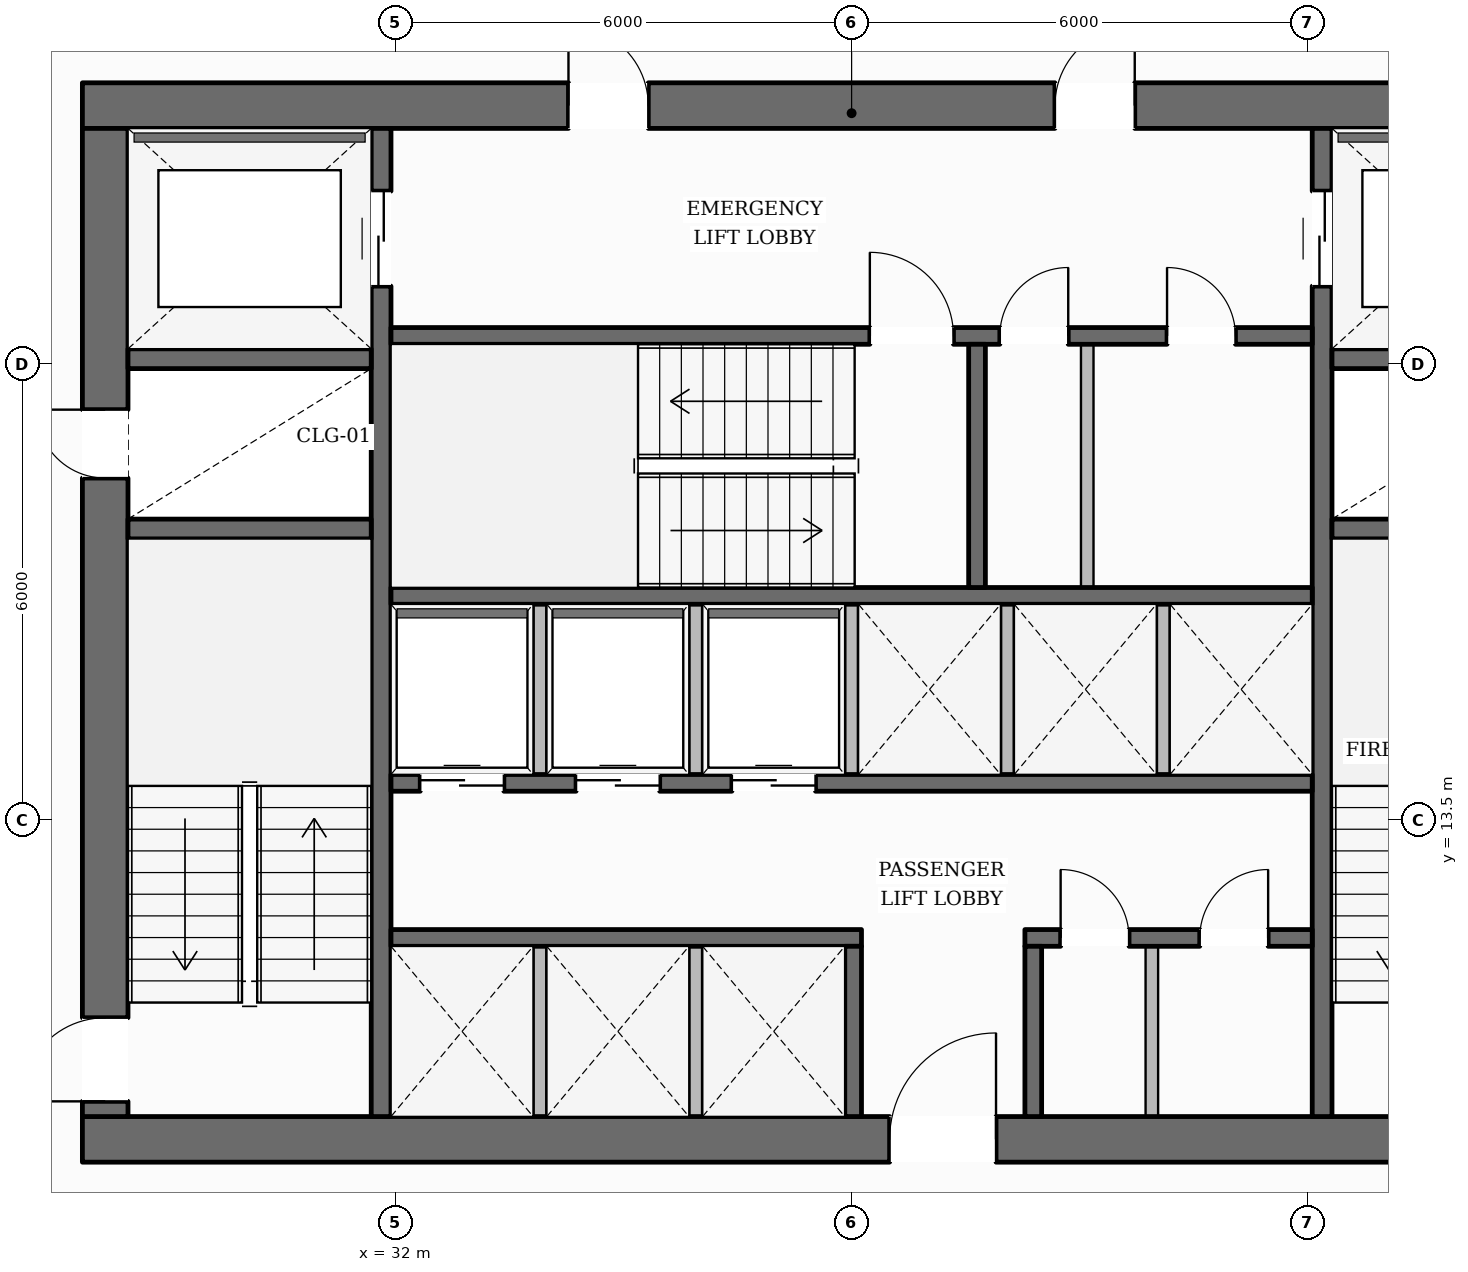
"""IFC4 building model, lengths in metres.
Left out: names, types, materials, properties, quantities, classifications, styles, units other than length and angle.
Written with IfcOpenShell. Run it as: python <this file> out.ifc"""

import sys

from ifc_helpers import new_model, si_unit, direction, frame, frame_2d, origin, place, context, subcontext, project, spatial, rectangle, extrude, element, fill, save


model = new_model("IFC4")
c1 = context("Model", 3, precision=1e-05, world=origin(), true_north=direction((0.0, 1.0)))
c2 = subcontext(c1, "Body", "Model", "MODEL_VIEW")
j1 = project(units=[si_unit("LENGTHUNIT", "METRE"), si_unit("PLANEANGLEUNIT", "RADIAN")], contexts=[c1])
p1 = place(None, origin())
s1 = spatial("IfcSite", under=j1, at=p1, CompositionType="ELEMENT")
p2 = place(p1, origin())
s2 = spatial("IfcBuilding", under=s1, at=p2, CompositionType="ELEMENT")
p3 = place(p2, frame((0.0, 0.0, 6.0)))
s3 = spatial("IfcBuildingStorey", under=s2, at=p3, CompositionType="ELEMENT", Elevation=6.0)
p4 = place(p3, frame((27.88, 9.3, 0.0), z_axis=(0.0, 0.0, 1.0), x_axis=(1.0, 0.0, 0.0)))
e1 = element("IfcWall", 1, at=p4, inside=s3, PredefinedType="SOLIDWALL", context=c2, shape_type="SweptSolid", body=[
    extrude(rectangle(XDim=20.24, YDim=0.6, at=frame_2d((10.12, 0.0))), origin(), (0.0, 0.0, 1.0), 3.59),
])
p5 = place(p4, frame((10.62, 0.0, 0.0)))
e2 = element("IfcOpeningElement", 2, at=p5, cuts=e1, PredefinedType="OPENING", context=c2, shape_type="SweptSolid", body=[
    extrude(rectangle(XDim=1.4, YDim=2.2, at=frame_2d((0.7, 1.1))), frame((0.0, 0.31, 0.0), z_axis=(0.0, -1.0, 0.0), x_axis=(1.0, 0.0, 0.0)), (0.0, 0.0, 1.0), 0.62),
])
p6 = place(p3, frame((27.88, 22.9, 0.0), z_axis=(0.0, 0.0, 1.0), x_axis=(1.0, 0.0, 0.0)))
e3 = element("IfcWall", 3, at=p6, inside=s3, PredefinedType="SOLIDWALL", context=c2, shape_type="SweptSolid", body=[
    extrude(rectangle(XDim=20.24, YDim=0.6, at=frame_2d((10.12, 0.0))), origin(), (0.0, 0.0, 1.0), 3.59),
])
p7 = place(p6, frame((6.395, 0.0, 0.0)))
e4 = element("IfcOpeningElement", 4, at=p7, cuts=e3, PredefinedType="OPENING", context=c2, shape_type="SweptSolid", body=[
    extrude(rectangle(XDim=1.05, YDim=2.15, at=frame_2d((0.525, 1.075))), frame((0.0, 0.31, 0.0), z_axis=(0.0, -1.0, 0.0), x_axis=(1.0, 0.0, 0.0)), (0.0, 0.0, 1.0), 0.62),
])
p8 = place(p6, frame((12.795, 0.0, 0.0)))
e5 = element("IfcOpeningElement", 5, at=p8, cuts=e3, PredefinedType="OPENING", context=c2, shape_type="SweptSolid", body=[
    extrude(rectangle(XDim=1.05, YDim=2.15, at=frame_2d((0.525, 1.075))), frame((0.0, 0.31, 0.0), z_axis=(0.0, -1.0, 0.0), x_axis=(1.0, 0.0, 0.0)), (0.0, 0.0, 1.0), 0.62),
])
p9 = place(p3, frame((28.18, 9.6, 0.0), z_axis=(0.0, 0.0, 1.0), x_axis=(0.0, 1.0, 0.0)))
e6 = element("IfcWall", 6, at=p9, inside=s3, PredefinedType="SOLIDWALL", context=c2, shape_type="SweptSolid", body=[
    extrude(rectangle(XDim=13.0, YDim=0.6, at=frame_2d((6.5, 0.0))), origin(), (0.0, 0.0, 1.0), 3.59),
])
p10 = place(p9, frame((0.2, 0.0, 0.0)))
e7 = element("IfcOpeningElement", 7, at=p10, cuts=e6, PredefinedType="OPENING", context=c2, shape_type="SweptSolid", body=[
    extrude(rectangle(XDim=1.1, YDim=2.15, at=frame_2d((0.55, 1.075))), frame((0.0, 0.31, 0.0), z_axis=(0.0, -1.0, 0.0), x_axis=(1.0, 0.0, 0.0)), (0.0, 0.0, 1.0), 0.62),
])
p11 = place(p9, frame((8.4, 0.0, 0.0)))
e8 = element("IfcOpeningElement", 8, at=p11, cuts=e6, PredefinedType="OPENING", context=c2, shape_type="SweptSolid", body=[
    extrude(rectangle(XDim=0.9, YDim=2.1, at=frame_2d((0.45, 1.05))), frame((0.0, 0.31, 0.0), z_axis=(0.0, -1.0, 0.0), x_axis=(1.0, 0.0, 0.0)), (0.0, 0.0, 1.0), 0.62),
])
p12 = place(p3, frame((31.81, 9.6, 0.0), z_axis=(0.0, 0.0, 1.0), x_axis=(0.0, 1.0, 0.0)))
e9 = element("IfcWall", 9, at=p12, inside=s3, PredefinedType="SHEAR", context=c2, shape_type="SweptSolid", body=[
    extrude(rectangle(XDim=13.0, YDim=0.26, at=frame_2d((6.5, 0.0))), origin(), (0.0, 0.0, 1.0), 3.59),
])
p13 = place(p12, frame((10.925, 0.0, 0.0)))
e10 = element("IfcOpeningElement", 10, at=p13, cuts=e9, PredefinedType="OPENING", context=c2, shape_type="SweptSolid", body=[
    extrude(rectangle(XDim=1.25, YDim=2.25, at=frame_2d((0.625, 1.125))), frame((0.0, 0.14, 0.0), z_axis=(0.0, -1.0, 0.0), x_axis=(1.0, 0.0, 0.0)), (0.0, 0.0, 1.0), 0.28),
])
p14 = place(p3, frame((44.19, 9.6, 0.0), z_axis=(0.0, 0.0, 1.0), x_axis=(0.0, 1.0, 0.0)))
e11 = element("IfcWall", 11, at=p14, inside=s3, PredefinedType="SHEAR", context=c2, shape_type="SweptSolid", body=[
    extrude(rectangle(XDim=13.0, YDim=0.26, at=frame_2d((6.5, 0.0))), origin(), (0.0, 0.0, 1.0), 3.59),
])
p15 = place(p14, frame((10.925, 0.0, 0.0)))
e12 = element("IfcOpeningElement", 12, at=p15, cuts=e11, PredefinedType="OPENING", context=c2, shape_type="SweptSolid", body=[
    extrude(rectangle(XDim=1.25, YDim=2.25, at=frame_2d((0.625, 1.125))), frame((0.0, 0.14, 0.0), z_axis=(0.0, -1.0, 0.0), x_axis=(1.0, 0.0, 0.0)), (0.0, 0.0, 1.0), 0.28),
])
for number, where, z_axis, x_axis in (
    (13, (28.48, 17.33, 0.0), (0.0, 0.0, 1.0), (1.0, 0.0, 0.0)),
    (14, (28.48, 19.57, 0.0), (0.0, 0.0, 1.0), (1.0, 0.0, 0.0)),
    (15, (44.32, 17.33, 0.0), (0.0, 0.0, 1.0), (1.0, 0.0, 0.0)),
    (16, (44.32, 19.57, 0.0), (0.0, 0.0, 1.0), (1.0, 0.0, 0.0)),
):
    element("IfcWall", number, at=place(p3, frame(where, z_axis=z_axis, x_axis=x_axis)), inside=s3, PredefinedType="SHEAR", context=c2, shape_type="SweptSolid", body=[
        extrude(rectangle(XDim=3.2, YDim=0.26, at=frame_2d((1.6, 0.0))), origin(), (0.0, 0.0, 1.0), 3.59),
    ])
p16 = place(p3, frame((31.94, 19.87, 0.0), z_axis=(0.0, 0.0, 1.0), x_axis=(1.0, 0.0, 0.0)))
e17 = element("IfcWall", 17, at=p16, inside=s3, PredefinedType="SOLIDWALL", context=c2, shape_type="SweptSolid", body=[
    extrude(rectangle(XDim=12.12, YDim=0.22, at=frame_2d((6.06, 0.0))), origin(), (0.0, 0.0, 1.0), 3.59),
])
p17 = place(p16, frame((6.3, 0.0, 0.0)))
e18 = element("IfcOpeningElement", 18, at=p17, cuts=e17, PredefinedType="OPENING", context=c2, shape_type="SweptSolid", body=[
    extrude(rectangle(XDim=1.1, YDim=2.15, at=frame_2d((0.55, 1.075))), frame((0.0, 0.12, 0.0), z_axis=(0.0, -1.0, 0.0), x_axis=(1.0, 0.0, 0.0)), (0.0, 0.0, 1.0), 0.24),
])
p18 = place(p16, frame((8.01, 0.0, 0.0)))
e19 = element("IfcOpeningElement", 19, at=p18, cuts=e17, PredefinedType="OPENING", context=c2, shape_type="SweptSolid", body=[
    extrude(rectangle(XDim=0.9, YDim=2.1, at=frame_2d((0.45, 1.05))), frame((0.0, 0.12, 0.0), z_axis=(0.0, -1.0, 0.0), x_axis=(1.0, 0.0, 0.0)), (0.0, 0.0, 1.0), 0.24),
])
p19 = place(p16, frame((10.21, 0.0, 0.0)))
e20 = element("IfcOpeningElement", 20, at=p19, cuts=e17, PredefinedType="OPENING", context=c2, shape_type="SweptSolid", body=[
    extrude(rectangle(XDim=0.9, YDim=2.1, at=frame_2d((0.45, 1.05))), frame((0.0, 0.12, 0.0), z_axis=(0.0, -1.0, 0.0), x_axis=(1.0, 0.0, 0.0)), (0.0, 0.0, 1.0), 0.24),
])
p20 = place(p3, frame((31.94, 16.45, 0.0), z_axis=(0.0, 0.0, 1.0), x_axis=(1.0, 0.0, 0.0)))
e21 = element("IfcWall", 21, at=p20, inside=s3, PredefinedType="SOLIDWALL", context=c2, shape_type="SweptSolid", body=[
    extrude(rectangle(XDim=12.12, YDim=0.22, at=frame_2d((6.06, 0.0))), origin(), (0.0, 0.0, 1.0), 3.59),
])
p21 = place(p3, frame((39.65, 16.56, 0.0), z_axis=(0.0, 0.0, 1.0), x_axis=(0.0, 1.0, 0.0)))
e22 = element("IfcWall", 22, at=p21, inside=s3, PredefinedType="SOLIDWALL", context=c2, shape_type="SweptSolid", body=[
    extrude(rectangle(XDim=3.2, YDim=0.22, at=frame_2d((1.6, 0.0))), origin(), (0.0, 0.0, 1.0), 3.59),
])
p22 = place(p3, frame((31.94, 13.99, 0.0), z_axis=(0.0, 0.0, 1.0), x_axis=(1.0, 0.0, 0.0)))
e23 = element("IfcWall", 23, at=p22, inside=s3, PredefinedType="SOLIDWALL", context=c2, shape_type="SweptSolid", body=[
    extrude(rectangle(XDim=12.12, YDim=0.22, at=frame_2d((6.06, 0.0))), origin(), (0.0, 0.0, 1.0), 3.59),
])
p23 = place(p22, frame((0.385, 0.0, 0.0)))
e24 = element("IfcOpeningElement", 24, at=p23, cuts=e23, PredefinedType="OPENING", context=c2, shape_type="SweptSolid", body=[
    extrude(rectangle(XDim=1.1, YDim=2.2, at=frame_2d((0.55, 1.1))), frame((0.0, 0.12, 0.0), z_axis=(0.0, -1.0, 0.0), x_axis=(1.0, 0.0, 0.0)), (0.0, 0.0, 1.0), 0.24),
])
p24 = place(p22, frame((2.435, 0.0, 0.0)))
e25 = element("IfcOpeningElement", 25, at=p24, cuts=e23, PredefinedType="OPENING", context=c2, shape_type="SweptSolid", body=[
    extrude(rectangle(XDim=1.1, YDim=2.2, at=frame_2d((0.55, 1.1))), frame((0.0, 0.12, 0.0), z_axis=(0.0, -1.0, 0.0), x_axis=(1.0, 0.0, 0.0)), (0.0, 0.0, 1.0), 0.24),
])
p25 = place(p22, frame((4.485, 0.0, 0.0)))
e26 = element("IfcOpeningElement", 26, at=p25, cuts=e23, PredefinedType="OPENING", context=c2, shape_type="SweptSolid", body=[
    extrude(rectangle(XDim=1.1, YDim=2.2, at=frame_2d((0.55, 1.1))), frame((0.0, 0.12, 0.0), z_axis=(0.0, -1.0, 0.0), x_axis=(1.0, 0.0, 0.0)), (0.0, 0.0, 1.0), 0.24),
])
p26 = place(p3, frame((31.94, 11.95, 0.0), z_axis=(0.0, 0.0, 1.0), x_axis=(1.0, 0.0, 0.0)))
e27 = element("IfcWall", 27, at=p26, inside=s3, PredefinedType="SOLIDWALL", context=c2, shape_type="SweptSolid", body=[
    extrude(rectangle(XDim=6.19, YDim=0.22, at=frame_2d((3.095, 0.0))), origin(), (0.0, 0.0, 1.0), 3.59),
])
p27 = place(p3, frame((40.28, 11.95, 0.0), z_axis=(0.0, 0.0, 1.0), x_axis=(1.0, 0.0, 0.0)))
e28 = element("IfcWall", 28, at=p27, inside=s3, PredefinedType="SOLIDWALL", context=c2, shape_type="SweptSolid", body=[
    extrude(rectangle(XDim=3.78, YDim=0.22, at=frame_2d((1.89, 0.0))), origin(), (0.0, 0.0, 1.0), 3.59),
])
p28 = place(p27, frame((0.47, 0.0, 0.0)))
e29 = element("IfcOpeningElement", 29, at=p28, cuts=e28, PredefinedType="OPENING", context=c2, shape_type="SweptSolid", body=[
    extrude(rectangle(XDim=0.9, YDim=2.1, at=frame_2d((0.45, 1.05))), frame((0.0, 0.12, 0.0), z_axis=(0.0, -1.0, 0.0), x_axis=(1.0, 0.0, 0.0)), (0.0, 0.0, 1.0), 0.24),
])
p29 = place(p27, frame((2.3, 0.0, 0.0)))
e30 = element("IfcOpeningElement", 30, at=p29, cuts=e28, PredefinedType="OPENING", context=c2, shape_type="SweptSolid", body=[
    extrude(rectangle(XDim=0.9, YDim=2.1, at=frame_2d((0.45, 1.05))), frame((0.0, 0.12, 0.0), z_axis=(0.0, -1.0, 0.0), x_axis=(1.0, 0.0, 0.0)), (0.0, 0.0, 1.0), 0.24),
])
for number, where, z_axis, x_axis in (
    (31, (38.02, 9.6, 0.0), (0.0, 0.0, 1.0), (0.0, 1.0, 0.0)),
    (32, (40.39, 9.6, 0.0), (0.0, 0.0, 1.0), (0.0, 1.0, 0.0)),
):
    element("IfcWall", number, at=place(p3, frame(where, z_axis=z_axis, x_axis=x_axis)), inside=s3, PredefinedType="SOLIDWALL", context=c2, shape_type="SweptSolid", body=[
        extrude(rectangle(XDim=2.24, YDim=0.22, at=frame_2d((1.12, 0.0))), origin(), (0.0, 0.0, 1.0), 3.59),
    ])
p30 = place(p3, frame((13.007, 15.062, 0.0), z_axis=(0.0, 0.0, 1.0), x_axis=(0.502349968378, 0.86466439112, 0.0)))
e33 = element("IfcWall", 33, at=p30, inside=s3, PredefinedType="STANDARD", context=c2, shape_type="SweptSolid", body=[
    extrude(rectangle(XDim=33.229, YDim=0.38, at=frame_2d((16.615, 0.0))), origin(), (0.0, 0.0, 1.0), 2.97),
])
p31 = place(p30, frame((29.24, 0.0, 0.65)))
e34 = element("IfcOpeningElement", 34, at=p31, cuts=e33, PredefinedType="OPENING", context=c2, shape_type="SweptSolid", body=[
    extrude(rectangle(XDim=1.65, YDim=1.75, at=frame_2d((0.825, 0.875))), frame((0.0, 0.2, 0.0), z_axis=(0.0, -1.0, 0.0), x_axis=(1.0, 0.0, 0.0)), (0.0, 0.0, 1.0), 0.4),
])
p32 = place(p30, frame((23.861, 0.0, 0.65)))
e35 = element("IfcOpeningElement", 35, at=p32, cuts=e33, PredefinedType="OPENING", context=c2, shape_type="SweptSolid", body=[
    extrude(rectangle(XDim=1.65, YDim=1.75, at=frame_2d((0.825, 0.875))), frame((0.0, 0.2, 0.0), z_axis=(0.0, -1.0, 0.0), x_axis=(1.0, 0.0, 0.0)), (0.0, 0.0, 1.0), 0.4),
])
p33 = place(p30, frame((13.101, 0.0, 0.65)))
e36 = element("IfcOpeningElement", 36, at=p33, cuts=e33, PredefinedType="OPENING", context=c2, shape_type="SweptSolid", body=[
    extrude(rectangle(XDim=1.65, YDim=1.75, at=frame_2d((0.825, 0.875))), frame((0.0, 0.2, 0.0), z_axis=(0.0, -1.0, 0.0), x_axis=(1.0, 0.0, 0.0)), (0.0, 0.0, 1.0), 0.4),
])
p34 = place(p30, frame((7.722, 0.0, 0.65)))
e37 = element("IfcOpeningElement", 37, at=p34, cuts=e33, PredefinedType="OPENING", context=c2, shape_type="SweptSolid", body=[
    extrude(rectangle(XDim=1.65, YDim=1.75, at=frame_2d((0.825, 0.875))), frame((0.0, 0.2, 0.0), z_axis=(0.0, -1.0, 0.0), x_axis=(1.0, 0.0, 0.0)), (0.0, 0.0, 1.0), 0.4),
])
p35 = place(p30, frame((2.342, 0.0, 0.65)))
e38 = element("IfcOpeningElement", 38, at=p35, cuts=e33, PredefinedType="OPENING", context=c2, shape_type="SweptSolid", body=[
    extrude(rectangle(XDim=1.65, YDim=1.75, at=frame_2d((0.825, 0.875))), frame((0.0, 0.2, 0.0), z_axis=(0.0, -1.0, 0.0), x_axis=(1.0, 0.0, 0.0)), (0.0, 0.0, 1.0), 0.4),
])
for number, where, z_axis, x_axis in (
    (39, (33.9, 9.6, 0.0), (0.0, 0.0, 1.0), (0.0, 1.0, 0.0)),
    (40, (35.95, 9.6, 0.0), (0.0, 0.0, 1.0), (0.0, 1.0, 0.0)),
    (41, (33.9, 14.1, 0.0), (0.0, 0.0, 1.0), (0.0, 1.0, 0.0)),
    (42, (35.95, 14.1, 0.0), (0.0, 0.0, 1.0), (0.0, 1.0, 0.0)),
    (43, (38.0, 14.1, 0.0), (0.0, 0.0, 1.0), (0.0, 1.0, 0.0)),
    (44, (40.05, 14.1, 0.0), (0.0, 0.0, 1.0), (0.0, 1.0, 0.0)),
    (45, (42.1, 14.1, 0.0), (0.0, 0.0, 1.0), (0.0, 1.0, 0.0)),
):
    element("IfcWall", number, at=place(p3, frame(where, z_axis=z_axis, x_axis=x_axis)), inside=s3, PredefinedType="PARTITIONING", context=c2, shape_type="SweptSolid", body=[
        extrude(rectangle(XDim=2.24, YDim=0.165, at=frame_2d((1.12, 0.0))), origin(), (0.0, 0.0, 1.0), 3.59),
    ])
p36 = place(p3, frame((41.1, 16.56, 0.0), z_axis=(0.0, 0.0, 1.0), x_axis=(0.0, 1.0, 0.0)))
e46 = element("IfcWall", 46, at=p36, inside=s3, PredefinedType="PARTITIONING", context=c2, shape_type="SweptSolid", body=[
    extrude(rectangle(XDim=3.2, YDim=0.165, at=frame_2d((1.6, 0.0))), origin(), (0.0, 0.0, 1.0), 3.59),
])
p37 = place(p3, frame((41.95, 9.6, 0.0), z_axis=(0.0, 0.0, 1.0), x_axis=(0.0, 1.0, 0.0)))
e47 = element("IfcWall", 47, at=p37, inside=s3, PredefinedType="PARTITIONING", context=c2, shape_type="SweptSolid", body=[
    extrude(rectangle(XDim=2.24, YDim=0.165, at=frame_2d((1.12, 0.0))), origin(), (0.0, 0.0, 1.0), 3.59),
])
p38 = place(p10, origin())
e48 = element("IfcDoor", 48, at=p38, inside=s3, OperationType="SINGLE_SWING_LEFT", PredefinedType="DOOR", context=c2, shape_type="SweptSolid", body=[
    extrude(rectangle(XDim=1.1, YDim=2.15, at=frame_2d((0.55, 1.075))), frame((0.0, 0.025, 0.0), z_axis=(0.0, -1.0, 0.0), x_axis=(1.0, 0.0, 0.0)), (0.0, 0.0, 1.0), 0.05),
])
fill(e7, e48)
p39 = place(p17, origin())
e49 = element("IfcDoor", 49, at=p39, inside=s3, OperationType="SINGLE_SWING_LEFT", PredefinedType="DOOR", context=c2, shape_type="SweptSolid", body=[
    extrude(rectangle(XDim=1.1, YDim=2.15, at=frame_2d((0.55, 1.075))), frame((0.0, 0.025, 0.0), z_axis=(0.0, -1.0, 0.0), x_axis=(1.0, 0.0, 0.0)), (0.0, 0.0, 1.0), 0.05),
])
fill(e18, e49)
p40 = place(p11, origin())
e50 = element("IfcDoor", 50, at=p40, inside=s3, OperationType="SINGLE_SWING_RIGHT", PredefinedType="DOOR", context=c2, shape_type="SweptSolid", body=[
    extrude(rectangle(XDim=0.9, YDim=2.1, at=frame_2d((0.45, 1.05))), frame((0.0, 0.025, 0.0), z_axis=(0.0, -1.0, 0.0), x_axis=(1.0, 0.0, 0.0)), (0.0, 0.0, 1.0), 0.05),
])
fill(e8, e50)
p41 = place(p7, origin())
e51 = element("IfcDoor", 51, at=p41, inside=s3, OperationType="SINGLE_SWING_LEFT", PredefinedType="DOOR", context=c2, shape_type="SweptSolid", body=[
    extrude(rectangle(XDim=1.05, YDim=2.15, at=frame_2d((0.525, 1.075))), frame((0.0, 0.025, 0.0), z_axis=(0.0, -1.0, 0.0), x_axis=(1.0, 0.0, 0.0)), (0.0, 0.0, 1.0), 0.05),
])
fill(e4, e51)
p42 = place(p8, origin())
e52 = element("IfcDoor", 52, at=p42, inside=s3, OperationType="SINGLE_SWING_RIGHT", PredefinedType="DOOR", context=c2, shape_type="SweptSolid", body=[
    extrude(rectangle(XDim=1.05, YDim=2.15, at=frame_2d((0.525, 1.075))), frame((0.0, 0.025, 0.0), z_axis=(0.0, -1.0, 0.0), x_axis=(1.0, 0.0, 0.0)), (0.0, 0.0, 1.0), 0.05),
])
fill(e5, e52)
p43 = place(p13, origin())
e53 = element("IfcDoor", 53, at=p43, inside=s3, OperationType="DOUBLE_DOOR_SLIDING", PredefinedType="DOOR", context=c2, shape_type="SweptSolid", body=[
    extrude(rectangle(XDim=1.25, YDim=2.25, at=frame_2d((0.625, 1.125))), frame((0.0, 0.025, 0.0), z_axis=(0.0, -1.0, 0.0), x_axis=(1.0, 0.0, 0.0)), (0.0, 0.0, 1.0), 0.05),
])
fill(e10, e53)
p44 = place(p15, origin())
e54 = element("IfcDoor", 54, at=p44, inside=s3, OperationType="DOUBLE_DOOR_SLIDING", PredefinedType="DOOR", context=c2, shape_type="SweptSolid", body=[
    extrude(rectangle(XDim=1.25, YDim=2.25, at=frame_2d((0.625, 1.125))), frame((0.0, 0.025, 0.0), z_axis=(0.0, -1.0, 0.0), x_axis=(1.0, 0.0, 0.0)), (0.0, 0.0, 1.0), 0.05),
])
fill(e12, e54)
p45 = place(p5, origin())
e55 = element("IfcDoor", 55, at=p45, inside=s3, OperationType="SINGLE_SWING_RIGHT", PredefinedType="DOOR", context=c2, shape_type="SweptSolid", body=[
    extrude(rectangle(XDim=1.4, YDim=2.2, at=frame_2d((0.7, 1.1))), frame((0.0, 0.025, 0.0), z_axis=(0.0, -1.0, 0.0), x_axis=(1.0, 0.0, 0.0)), (0.0, 0.0, 1.0), 0.05),
])
fill(e2, e55)
p46 = place(p23, origin())
e56 = element("IfcDoor", 56, at=p46, inside=s3, OperationType="DOUBLE_DOOR_SLIDING", PredefinedType="DOOR", context=c2, shape_type="SweptSolid", body=[
    extrude(rectangle(XDim=1.1, YDim=2.2, at=frame_2d((0.55, 1.1))), frame((0.0, 0.025, 0.0), z_axis=(0.0, -1.0, 0.0), x_axis=(1.0, 0.0, 0.0)), (0.0, 0.0, 1.0), 0.05),
])
fill(e24, e56)
p47 = place(p24, origin())
e57 = element("IfcDoor", 57, at=p47, inside=s3, OperationType="DOUBLE_DOOR_SLIDING", PredefinedType="DOOR", context=c2, shape_type="SweptSolid", body=[
    extrude(rectangle(XDim=1.1, YDim=2.2, at=frame_2d((0.55, 1.1))), frame((0.0, 0.025, 0.0), z_axis=(0.0, -1.0, 0.0), x_axis=(1.0, 0.0, 0.0)), (0.0, 0.0, 1.0), 0.05),
])
fill(e25, e57)
p48 = place(p25, origin())
e58 = element("IfcDoor", 58, at=p48, inside=s3, OperationType="DOUBLE_DOOR_SLIDING", PredefinedType="DOOR", context=c2, shape_type="SweptSolid", body=[
    extrude(rectangle(XDim=1.1, YDim=2.2, at=frame_2d((0.55, 1.1))), frame((0.0, 0.025, 0.0), z_axis=(0.0, -1.0, 0.0), x_axis=(1.0, 0.0, 0.0)), (0.0, 0.0, 1.0), 0.05),
])
fill(e26, e58)
p49 = place(p18, origin())
e59 = element("IfcDoor", 59, at=p49, inside=s3, OperationType="SINGLE_SWING_RIGHT", PredefinedType="DOOR", context=c2, shape_type="SweptSolid", body=[
    extrude(rectangle(XDim=0.9, YDim=2.1, at=frame_2d((0.45, 1.05))), frame((0.0, 0.025, 0.0), z_axis=(0.0, -1.0, 0.0), x_axis=(1.0, 0.0, 0.0)), (0.0, 0.0, 1.0), 0.05),
])
fill(e19, e59)
p50 = place(p19, origin())
e60 = element("IfcDoor", 60, at=p50, inside=s3, OperationType="SINGLE_SWING_LEFT", PredefinedType="DOOR", context=c2, shape_type="SweptSolid", body=[
    extrude(rectangle(XDim=0.9, YDim=2.1, at=frame_2d((0.45, 1.05))), frame((0.0, 0.025, 0.0), z_axis=(0.0, -1.0, 0.0), x_axis=(1.0, 0.0, 0.0)), (0.0, 0.0, 1.0), 0.05),
])
fill(e20, e60)
p51 = place(p28, origin())
e61 = element("IfcDoor", 61, at=p51, inside=s3, OperationType="SINGLE_SWING_LEFT", PredefinedType="DOOR", context=c2, shape_type="SweptSolid", body=[
    extrude(rectangle(XDim=0.9, YDim=2.1, at=frame_2d((0.45, 1.05))), frame((0.0, 0.025, 0.0), z_axis=(0.0, -1.0, 0.0), x_axis=(1.0, 0.0, 0.0)), (0.0, 0.0, 1.0), 0.05),
])
fill(e29, e61)
p52 = place(p29, origin())
e62 = element("IfcDoor", 62, at=p52, inside=s3, OperationType="SINGLE_SWING_RIGHT", PredefinedType="DOOR", context=c2, shape_type="SweptSolid", body=[
    extrude(rectangle(XDim=0.9, YDim=2.1, at=frame_2d((0.45, 1.05))), frame((0.0, 0.025, 0.0), z_axis=(0.0, -1.0, 0.0), x_axis=(1.0, 0.0, 0.0)), (0.0, 0.0, 1.0), 0.05),
])
fill(e30, e62)
save(model, sys.argv[1])
